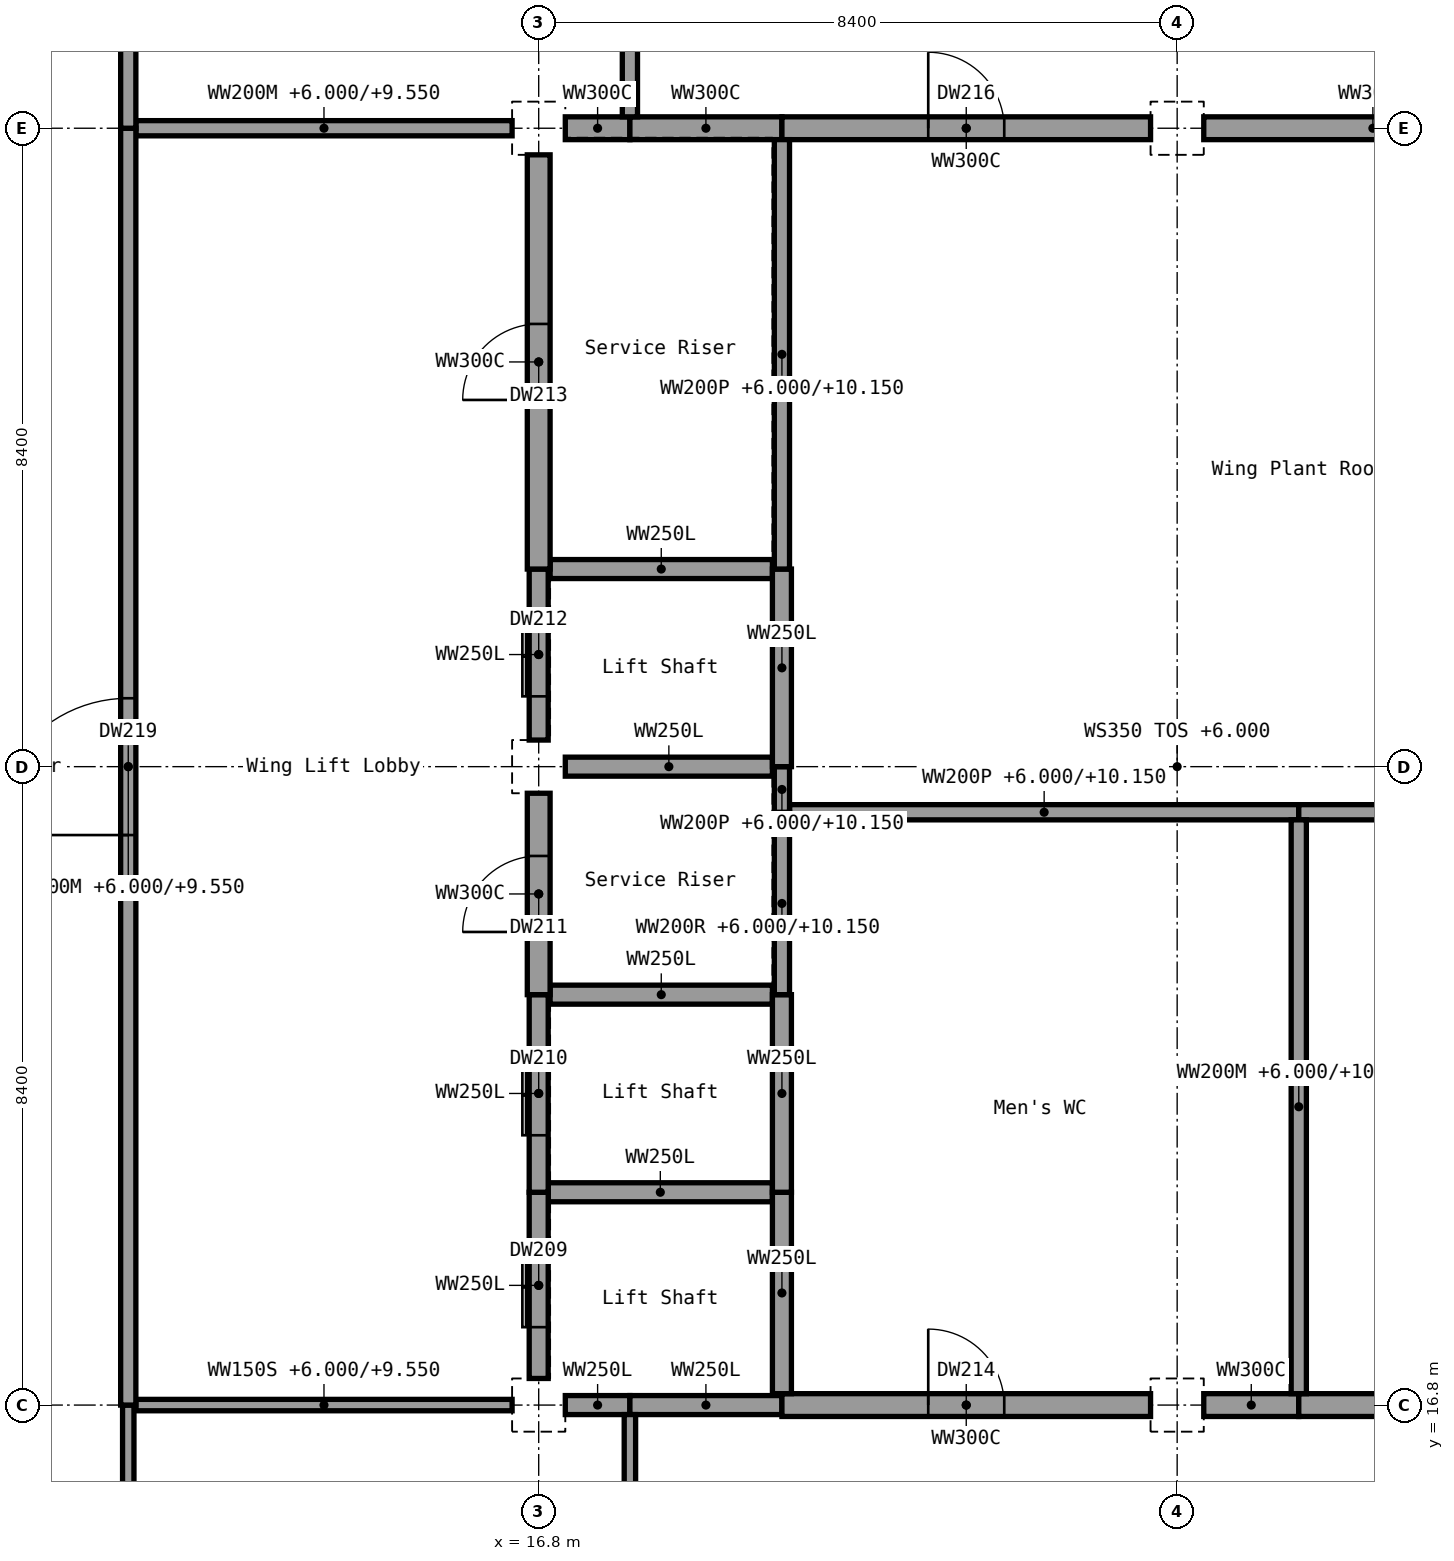
"""IFC4 building model, lengths in metres.
Left out: names, types, materials, properties, quantities, classifications, styles, units other than length and angle.
Written with IfcOpenShell. Run it as: python <this file> out.ifc"""

import sys

from ifc_helpers import new_model, si_unit, direction, frame, frame_2d, origin, origin_2d, place, context, subcontext, project, spatial, rectangle, extrude, element, fill, save


model = new_model("IFC4")
c1 = context("Model", 3, precision=1e-05, world=origin(), true_north=direction((0.0, 1.0)))
c2 = subcontext(c1, "Body", "Model", "MODEL_VIEW")
j1 = project(units=[si_unit("LENGTHUNIT", "METRE"), si_unit("PLANEANGLEUNIT", "RADIAN")], contexts=[c1])
p1 = place(None, origin())
s1 = spatial("IfcSite", under=j1, at=p1, CompositionType="ELEMENT")
p2 = place(p1, origin())
s2 = spatial("IfcBuilding", under=s1, at=p2, CompositionType="ELEMENT")
p3 = place(p2, frame((0.0, 0.0, 6.0)))
s3 = spatial("IfcBuildingStorey", under=s2, at=p3, CompositionType="ELEMENT", Elevation=6.0)
for number, where, z_axis, x_axis in (
    (1, (16.8, 16.8, 0.0), (0.0, 0.0, 1.0), (1.0, 0.0, 0.0)),
    (2, (16.8, 25.2, 0.0), (0.0, 0.0, 1.0), (1.0, 0.0, 0.0)),
    (3, (16.8, 33.6, 0.0), (0.0, 0.0, 1.0), (1.0, 0.0, 0.0)),
    (4, (25.2, 16.8, 0.0), (0.0, 0.0, 1.0), (1.0, 0.0, 0.0)),
    (5, (25.2, 33.6, 0.0), (0.0, 0.0, 1.0), (1.0, 0.0, 0.0)),
):
    element("IfcColumn", number, at=place(p3, frame(where, z_axis=z_axis, x_axis=x_axis)), inside=s3, PredefinedType="COLUMN", context=c2, shape_type="SweptSolid", body=[
        extrude(rectangle(XDim=0.7, YDim=0.7, at=origin_2d()), origin(), (0.0, 0.0, 1.0), 4.5),
    ])
p4 = place(p3, frame((11.5, 16.8, 0.0), z_axis=(0.0, 0.0, 1.0), x_axis=(1.0, 0.0, 0.0)))
e6 = element("IfcWall", 6, at=p4, inside=s3, PredefinedType="PARTITIONING", context=c2, shape_type="SweptSolid", body=[
    extrude(rectangle(XDim=4.95, YDim=0.15, at=frame_2d((2.475, 0.0))), origin(), (0.0, 0.0, 1.0), 3.55),
])
p5 = place(p3, frame((17.15, 16.8, 0.0), z_axis=(0.0, 0.0, 1.0), x_axis=(1.0, 0.0, 0.0)))
e7 = element("IfcWall", 7, at=p5, inside=s3, PredefinedType="SHEAR", context=c2, shape_type="SweptSolid", body=[
    extrude(rectangle(XDim=0.85, YDim=0.25, at=frame_2d((0.425, 0.0))), origin(), (0.0, 0.0, 1.0), 4.15),
])
p6 = place(p3, frame((18.0, 16.8, 0.0), z_axis=(0.0, 0.0, 1.0), x_axis=(1.0, 0.0, 0.0)))
e8 = element("IfcWall", 8, at=p6, inside=s3, PredefinedType="SHEAR", context=c2, shape_type="SweptSolid", body=[
    extrude(rectangle(XDim=2.0, YDim=0.25, at=frame_2d((1.0, 0.0))), origin(), (0.0, 0.0, 1.0), 4.15),
])
p7 = place(p3, frame((20.0, 16.8, 0.0), z_axis=(0.0, 0.0, 1.0), x_axis=(1.0, 0.0, 0.0)))
e9 = element("IfcWall", 9, at=p7, inside=s3, PredefinedType="SHEAR", context=c2, shape_type="SweptSolid", body=[
    extrude(rectangle(XDim=4.85, YDim=0.3, at=frame_2d((2.425, 0.0))), origin(), (0.0, 0.0, 1.0), 4.15),
])
p8 = place(p7, frame((1.925, 0.0, 0.0)))
e10 = element("IfcOpeningElement", 10, at=p8, cuts=e9, PredefinedType="OPENING", context=c2, shape_type="SweptSolid", body=[
    extrude(rectangle(XDim=1.0, YDim=2.1, at=frame_2d((0.5, 1.05))), frame((0.0, 0.15, 0.0), z_axis=(0.0, -1.0, 0.0), x_axis=(1.0, 0.0, 0.0)), (0.0, 0.0, 1.0), 0.3),
])
p9 = place(p3, frame((25.55, 16.8, 0.0), z_axis=(0.0, 0.0, 1.0), x_axis=(1.0, 0.0, 0.0)))
e11 = element("IfcWall", 11, at=p9, inside=s3, PredefinedType="SHEAR", context=c2, shape_type="SweptSolid", body=[
    extrude(rectangle(XDim=1.25, YDim=0.3, at=frame_2d((0.625, 0.0))), origin(), (0.0, 0.0, 1.0), 4.15),
])
p10 = place(p3, frame((26.8, 16.8, 0.0), z_axis=(0.0, 0.0, 1.0), x_axis=(1.0, 0.0, 0.0)))
e12 = element("IfcWall", 12, at=p10, inside=s3, PredefinedType="SHEAR", context=c2, shape_type="SweptSolid", body=[
    extrude(rectangle(XDim=3.2, YDim=0.3, at=frame_2d((1.6, 0.0))), origin(), (0.0, 0.0, 1.0), 4.15),
])
p11 = place(p10, frame((1.1, 0.0, 0.0)))
e13 = element("IfcOpeningElement", 13, at=p11, cuts=e12, PredefinedType="OPENING", context=c2, shape_type="SweptSolid", body=[
    extrude(rectangle(XDim=1.0, YDim=2.1, at=frame_2d((0.5, 1.05))), frame((0.0, 0.15, 0.0), z_axis=(0.0, -1.0, 0.0), x_axis=(1.0, 0.0, 0.0)), (0.0, 0.0, 1.0), 0.3),
])
p12 = place(p3, frame((16.925, 19.6, 0.0), z_axis=(0.0, 0.0, 1.0), x_axis=(1.0, 0.0, 0.0)))
e14 = element("IfcWall", 14, at=p12, inside=s3, PredefinedType="SHEAR", context=c2, shape_type="SweptSolid", body=[
    extrude(rectangle(XDim=2.95, YDim=0.25, at=frame_2d((1.475, 0.0))), origin(), (0.0, 0.0, 1.0), 4.15),
])
p13 = place(p3, frame((16.95, 22.2, 0.0), z_axis=(0.0, 0.0, 1.0), x_axis=(1.0, 0.0, 0.0)))
e15 = element("IfcWall", 15, at=p13, inside=s3, PredefinedType="SHEAR", context=c2, shape_type="SweptSolid", body=[
    extrude(rectangle(XDim=2.925, YDim=0.25, at=frame_2d((1.462, 0.0))), origin(), (0.0, 0.0, 1.0), 4.15),
])
p14 = place(p3, frame((20.1, 24.6, 0.0), z_axis=(0.0, 0.0, 1.0), x_axis=(1.0, 0.0, 0.0)))
e16 = element("IfcWall", 16, at=p14, inside=s3, PredefinedType="SOLIDWALL", context=c2, shape_type="SweptSolid", body=[
    extrude(rectangle(XDim=6.7, YDim=0.2, at=frame_2d((3.35, 0.0))), origin(), (0.0, 0.0, 1.0), 4.15),
])
p15 = place(p3, frame((26.8, 24.6, 0.0), z_axis=(0.0, 0.0, 1.0), x_axis=(1.0, 0.0, 0.0)))
e17 = element("IfcWall", 17, at=p15, inside=s3, PredefinedType="SOLIDWALL", context=c2, shape_type="SweptSolid", body=[
    extrude(rectangle(XDim=6.65, YDim=0.2, at=frame_2d((3.325, 0.0))), origin(), (0.0, 0.0, 1.0), 4.15),
])
p16 = place(p3, frame((17.15, 25.2, 0.0), z_axis=(0.0, 0.0, 1.0), x_axis=(1.0, 0.0, 0.0)))
e18 = element("IfcWall", 18, at=p16, inside=s3, PredefinedType="SHEAR", context=c2, shape_type="SweptSolid", body=[
    extrude(rectangle(XDim=2.725, YDim=0.25, at=frame_2d((1.363, 0.0))), origin(), (0.0, 0.0, 1.0), 4.15),
])
p17 = place(p3, frame((16.95, 27.8, 0.0), z_axis=(0.0, 0.0, 1.0), x_axis=(1.0, 0.0, 0.0)))
e19 = element("IfcWall", 19, at=p17, inside=s3, PredefinedType="SHEAR", context=c2, shape_type="SweptSolid", body=[
    extrude(rectangle(XDim=2.925, YDim=0.25, at=frame_2d((1.462, 0.0))), origin(), (0.0, 0.0, 1.0), 4.15),
])
p18 = place(p3, frame((11.5, 33.6, 0.0), z_axis=(0.0, 0.0, 1.0), x_axis=(1.0, 0.0, 0.0)))
e20 = element("IfcWall", 20, at=p18, inside=s3, PredefinedType="PARTITIONING", context=c2, shape_type="SweptSolid", body=[
    extrude(rectangle(XDim=4.95, YDim=0.2, at=frame_2d((2.475, 0.0))), origin(), (0.0, 0.0, 1.0), 3.55),
])
p19 = place(p3, frame((17.15, 33.6, 0.0), z_axis=(0.0, 0.0, 1.0), x_axis=(1.0, 0.0, 0.0)))
e21 = element("IfcWall", 21, at=p19, inside=s3, PredefinedType="SHEAR", context=c2, shape_type="SweptSolid", body=[
    extrude(rectangle(XDim=0.85, YDim=0.3, at=frame_2d((0.425, 0.0))), origin(), (0.0, 0.0, 1.0), 4.15),
])
p20 = place(p3, frame((18.0, 33.6, 0.0), z_axis=(0.0, 0.0, 1.0), x_axis=(1.0, 0.0, 0.0)))
e22 = element("IfcWall", 22, at=p20, inside=s3, PredefinedType="SHEAR", context=c2, shape_type="SweptSolid", body=[
    extrude(rectangle(XDim=2.0, YDim=0.3, at=frame_2d((1.0, 0.0))), origin(), (0.0, 0.0, 1.0), 4.15),
])
p21 = place(p3, frame((20.0, 33.6, 0.0), z_axis=(0.0, 0.0, 1.0), x_axis=(1.0, 0.0, 0.0)))
e23 = element("IfcWall", 23, at=p21, inside=s3, PredefinedType="SHEAR", context=c2, shape_type="SweptSolid", body=[
    extrude(rectangle(XDim=4.85, YDim=0.3, at=frame_2d((2.425, 0.0))), origin(), (0.0, 0.0, 1.0), 4.15),
])
p22 = place(p21, frame((1.925, 0.0, 0.0)))
e24 = element("IfcOpeningElement", 24, at=p22, cuts=e23, PredefinedType="OPENING", context=c2, shape_type="SweptSolid", body=[
    extrude(rectangle(XDim=1.0, YDim=2.1, at=frame_2d((0.5, 1.05))), frame((0.0, 0.15, 0.0), z_axis=(0.0, -1.0, 0.0), x_axis=(1.0, 0.0, 0.0)), (0.0, 0.0, 1.0), 0.3),
])
p23 = place(p3, frame((25.55, 33.6, 0.0), z_axis=(0.0, 0.0, 1.0), x_axis=(1.0, 0.0, 0.0)))
e25 = element("IfcWall", 25, at=p23, inside=s3, PredefinedType="SHEAR", context=c2, shape_type="SweptSolid", body=[
    extrude(rectangle(XDim=4.45, YDim=0.3, at=frame_2d((2.225, 0.0))), origin(), (0.0, 0.0, 1.0), 4.15),
])
p24 = place(p3, frame((11.4, 11.4, 0.0), z_axis=(0.0, 0.0, 1.0), x_axis=(0.0, 1.0, 0.0)))
e26 = element("IfcWall", 26, at=p24, inside=s3, PredefinedType="PARTITIONING", context=c2, shape_type="SweptSolid", body=[
    extrude(rectangle(XDim=5.4, YDim=0.15, at=frame_2d((2.7, 0.0))), origin(), (0.0, 0.0, 1.0), 3.55),
])
p25 = place(p3, frame((11.4, 16.8, 0.0), z_axis=(0.0, 0.0, 1.0), x_axis=(0.0, 1.0, 0.0)))
e27 = element("IfcWall", 27, at=p25, inside=s3, PredefinedType="PARTITIONING", context=c2, shape_type="SweptSolid", body=[
    extrude(rectangle(XDim=16.8, YDim=0.2, at=frame_2d((8.4, 0.0))), origin(), (0.0, 0.0, 1.0), 3.55),
])
p26 = place(p25, frame((7.5, 0.0, 0.0)))
e28 = element("IfcOpeningElement", 28, at=p26, cuts=e27, PredefinedType="OPENING", context=c2, shape_type="SweptSolid", body=[
    extrude(rectangle(XDim=1.8, YDim=2.1, at=frame_2d((0.9, 1.05))), frame((0.0, 0.1, 0.0), z_axis=(0.0, -1.0, 0.0), x_axis=(1.0, 0.0, 0.0)), (0.0, 0.0, 1.0), 0.2),
])
p27 = place(p3, frame((11.4, 33.6, 0.0), z_axis=(0.0, 0.0, 1.0), x_axis=(0.0, 1.0, 0.0)))
e29 = element("IfcWall", 29, at=p27, inside=s3, PredefinedType="PARTITIONING", context=c2, shape_type="SweptSolid", body=[
    extrude(rectangle(XDim=5.4, YDim=0.2, at=frame_2d((2.7, 0.0))), origin(), (0.0, 0.0, 1.0), 3.55),
])
p28 = place(p3, frame((16.8, 17.15, 0.0), z_axis=(0.0, 0.0, 1.0), x_axis=(0.0, 1.0, 0.0)))
e30 = element("IfcWall", 30, at=p28, inside=s3, PredefinedType="SHEAR", context=c2, shape_type="SweptSolid", body=[
    extrude(rectangle(XDim=2.45, YDim=0.25, at=frame_2d((1.225, 0.0))), origin(), (0.0, 0.0, 1.0), 4.15),
])
p29 = place(p28, frame((0.675, 0.0, 0.0)))
e31 = element("IfcOpeningElement", 31, at=p29, cuts=e30, PredefinedType="OPENING", context=c2, shape_type="SweptSolid", body=[
    extrude(rectangle(XDim=1.1, YDim=2.1, at=frame_2d((0.55, 1.05))), frame((0.0, 0.125, 0.0), z_axis=(0.0, -1.0, 0.0), x_axis=(1.0, 0.0, 0.0)), (0.0, 0.0, 1.0), 0.25),
])
p30 = place(p3, frame((16.8, 19.6, 0.0), z_axis=(0.0, 0.0, 1.0), x_axis=(0.0, 1.0, 0.0)))
e32 = element("IfcWall", 32, at=p30, inside=s3, PredefinedType="SHEAR", context=c2, shape_type="SweptSolid", body=[
    extrude(rectangle(XDim=2.6, YDim=0.25, at=frame_2d((1.3, 0.0))), origin(), (0.0, 0.0, 1.0), 4.15),
])
p31 = place(p30, frame((0.75, 0.0, 0.0)))
e33 = element("IfcOpeningElement", 33, at=p31, cuts=e32, PredefinedType="OPENING", context=c2, shape_type="SweptSolid", body=[
    extrude(rectangle(XDim=1.1, YDim=2.1, at=frame_2d((0.55, 1.05))), frame((0.0, 0.125, 0.0), z_axis=(0.0, -1.0, 0.0), x_axis=(1.0, 0.0, 0.0)), (0.0, 0.0, 1.0), 0.25),
])
p32 = place(p3, frame((16.8, 22.2, 0.0), z_axis=(0.0, 0.0, 1.0), x_axis=(0.0, 1.0, 0.0)))
e34 = element("IfcWall", 34, at=p32, inside=s3, PredefinedType="SHEAR", context=c2, shape_type="SweptSolid", body=[
    extrude(rectangle(XDim=2.65, YDim=0.3, at=frame_2d((1.325, 0.0))), origin(), (0.0, 0.0, 1.0), 4.15),
])
p33 = place(p32, frame((0.825, 0.0, 0.0)))
e35 = element("IfcOpeningElement", 35, at=p33, cuts=e34, PredefinedType="OPENING", context=c2, shape_type="SweptSolid", body=[
    extrude(rectangle(XDim=1.0, YDim=2.1, at=frame_2d((0.5, 1.05))), frame((0.0, 0.15, 0.0), z_axis=(0.0, -1.0, 0.0), x_axis=(1.0, 0.0, 0.0)), (0.0, 0.0, 1.0), 0.3),
])
p34 = place(p3, frame((16.8, 25.55, 0.0), z_axis=(0.0, 0.0, 1.0), x_axis=(0.0, 1.0, 0.0)))
e36 = element("IfcWall", 36, at=p34, inside=s3, PredefinedType="SHEAR", context=c2, shape_type="SweptSolid", body=[
    extrude(rectangle(XDim=2.25, YDim=0.25, at=frame_2d((1.125, 0.0))), origin(), (0.0, 0.0, 1.0), 4.15),
])
p35 = place(p34, frame((0.575, 0.0, 0.0)))
e37 = element("IfcOpeningElement", 37, at=p35, cuts=e36, PredefinedType="OPENING", context=c2, shape_type="SweptSolid", body=[
    extrude(rectangle(XDim=1.1, YDim=2.1, at=frame_2d((0.55, 1.05))), frame((0.0, 0.125, 0.0), z_axis=(0.0, -1.0, 0.0), x_axis=(1.0, 0.0, 0.0)), (0.0, 0.0, 1.0), 0.25),
])
p36 = place(p3, frame((16.8, 27.8, 0.0), z_axis=(0.0, 0.0, 1.0), x_axis=(0.0, 1.0, 0.0)))
e38 = element("IfcWall", 38, at=p36, inside=s3, PredefinedType="SHEAR", context=c2, shape_type="SweptSolid", body=[
    extrude(rectangle(XDim=5.45, YDim=0.3, at=frame_2d((2.725, 0.0))), origin(), (0.0, 0.0, 1.0), 4.15),
])
p37 = place(p36, frame((2.225, 0.0, 0.0)))
e39 = element("IfcOpeningElement", 39, at=p37, cuts=e38, PredefinedType="OPENING", context=c2, shape_type="SweptSolid", body=[
    extrude(rectangle(XDim=1.0, YDim=2.1, at=frame_2d((0.5, 1.05))), frame((0.0, 0.15, 0.0), z_axis=(0.0, -1.0, 0.0), x_axis=(1.0, 0.0, 0.0)), (0.0, 0.0, 1.0), 0.3),
])
p38 = place(p3, frame((18.0, 11.5, 0.0), z_axis=(0.0, 0.0, 1.0), x_axis=(0.0, 1.0, 0.0)))
e40 = element("IfcWall", 40, at=p38, inside=s3, PredefinedType="PARTITIONING", context=c2, shape_type="SweptSolid", body=[
    extrude(rectangle(XDim=5.175, YDim=0.15, at=frame_2d((2.587, 0.0))), origin(), (0.0, 0.0, 1.0), 4.15),
])
p39 = place(p3, frame((18.0, 33.75, 0.0), z_axis=(0.0, 0.0, 1.0), x_axis=(0.0, 1.0, 0.0)))
e41 = element("IfcWall", 41, at=p39, inside=s3, PredefinedType="SOLIDWALL", context=c2, shape_type="SweptSolid", body=[
    extrude(rectangle(XDim=5.15, YDim=0.2, at=frame_2d((2.575, 0.0))), origin(), (0.0, 0.0, 1.0), 4.15),
])
p40 = place(p3, frame((20.0, 16.95, 0.0), z_axis=(0.0, 0.0, 1.0), x_axis=(0.0, 1.0, 0.0)))
e42 = element("IfcWall", 42, at=p40, inside=s3, PredefinedType="SHEAR", context=c2, shape_type="SweptSolid", body=[
    extrude(rectangle(XDim=2.65, YDim=0.25, at=frame_2d((1.325, 0.0))), origin(), (0.0, 0.0, 1.0), 4.15),
])
p41 = place(p3, frame((20.0, 19.6, 0.0), z_axis=(0.0, 0.0, 1.0), x_axis=(0.0, 1.0, 0.0)))
e43 = element("IfcWall", 43, at=p41, inside=s3, PredefinedType="SHEAR", context=c2, shape_type="SweptSolid", body=[
    extrude(rectangle(XDim=2.6, YDim=0.25, at=frame_2d((1.3, 0.0))), origin(), (0.0, 0.0, 1.0), 4.15),
])
p42 = place(p3, frame((20.0, 22.2, 0.0), z_axis=(0.0, 0.0, 1.0), x_axis=(0.0, 1.0, 0.0)))
e44 = element("IfcWall", 44, at=p42, inside=s3, PredefinedType="SOLIDWALL", context=c2, shape_type="SweptSolid", body=[
    extrude(rectangle(XDim=2.4, YDim=0.2, at=frame_2d((1.2, 0.0))), origin(), (0.0, 0.0, 1.0), 4.15),
])
p43 = place(p3, frame((20.0, 24.6, 0.0), z_axis=(0.0, 0.0, 1.0), x_axis=(0.0, 1.0, 0.0)))
e45 = element("IfcWall", 45, at=p43, inside=s3, PredefinedType="SOLIDWALL", context=c2, shape_type="SweptSolid", body=[
    extrude(rectangle(XDim=0.6, YDim=0.2, at=frame_2d((0.3, 0.0))), origin(), (0.0, 0.0, 1.0), 4.15),
])
p44 = place(p3, frame((20.0, 25.2, 0.0), z_axis=(0.0, 0.0, 1.0), x_axis=(0.0, 1.0, 0.0)))
e46 = element("IfcWall", 46, at=p44, inside=s3, PredefinedType="SHEAR", context=c2, shape_type="SweptSolid", body=[
    extrude(rectangle(XDim=2.6, YDim=0.25, at=frame_2d((1.3, 0.0))), origin(), (0.0, 0.0, 1.0), 4.15),
])
p45 = place(p3, frame((20.0, 27.8, 0.0), z_axis=(0.0, 0.0, 1.0), x_axis=(0.0, 1.0, 0.0)))
e47 = element("IfcWall", 47, at=p45, inside=s3, PredefinedType="SOLIDWALL", context=c2, shape_type="SweptSolid", body=[
    extrude(rectangle(XDim=5.65, YDim=0.2, at=frame_2d((2.825, 0.0))), origin(), (0.0, 0.0, 1.0), 4.15),
])
p46 = place(p3, frame((26.8, 16.95, 0.0), z_axis=(0.0, 0.0, 1.0), x_axis=(0.0, 1.0, 0.0)))
e48 = element("IfcWall", 48, at=p46, inside=s3, PredefinedType="PARTITIONING", context=c2, shape_type="SweptSolid", body=[
    extrude(rectangle(XDim=7.55, YDim=0.2, at=frame_2d((3.775, 0.0))), origin(), (0.0, 0.0, 1.0), 4.15),
])
p47 = place(p29, origin())
e49 = element("IfcDoor", 49, at=p47, inside=s3, OperationType="DOUBLE_DOOR_SLIDING", PredefinedType="DOOR", context=c2, shape_type="SweptSolid", body=[
    extrude(rectangle(XDim=1.1, YDim=2.1, at=frame_2d((0.55, 1.05))), frame((0.0, 0.025, 0.0), z_axis=(0.0, -1.0, 0.0), x_axis=(1.0, 0.0, 0.0)), (0.0, 0.0, 1.0), 0.05),
])
fill(e31, e49)
p48 = place(p31, origin())
e50 = element("IfcDoor", 50, at=p48, inside=s3, OperationType="DOUBLE_DOOR_SLIDING", PredefinedType="DOOR", context=c2, shape_type="SweptSolid", body=[
    extrude(rectangle(XDim=1.1, YDim=2.1, at=frame_2d((0.55, 1.05))), frame((0.0, 0.025, 0.0), z_axis=(0.0, -1.0, 0.0), x_axis=(1.0, 0.0, 0.0)), (0.0, 0.0, 1.0), 0.05),
])
fill(e33, e50)
p49 = place(p33, origin())
e51 = element("IfcDoor", 51, at=p49, inside=s3, OperationType="SINGLE_SWING_LEFT", PredefinedType="DOOR", context=c2, shape_type="SweptSolid", body=[
    extrude(rectangle(XDim=1.0, YDim=2.1, at=frame_2d((0.5, 1.05))), frame((0.0, 0.025, 0.0), z_axis=(0.0, -1.0, 0.0), x_axis=(1.0, 0.0, 0.0)), (0.0, 0.0, 1.0), 0.05),
])
fill(e35, e51)
p50 = place(p35, origin())
e52 = element("IfcDoor", 52, at=p50, inside=s3, OperationType="DOUBLE_DOOR_SLIDING", PredefinedType="DOOR", context=c2, shape_type="SweptSolid", body=[
    extrude(rectangle(XDim=1.1, YDim=2.1, at=frame_2d((0.55, 1.05))), frame((0.0, 0.025, 0.0), z_axis=(0.0, -1.0, 0.0), x_axis=(1.0, 0.0, 0.0)), (0.0, 0.0, 1.0), 0.05),
])
fill(e37, e52)
p51 = place(p37, origin())
e53 = element("IfcDoor", 53, at=p51, inside=s3, OperationType="SINGLE_SWING_LEFT", PredefinedType="DOOR", context=c2, shape_type="SweptSolid", body=[
    extrude(rectangle(XDim=1.0, YDim=2.1, at=frame_2d((0.5, 1.05))), frame((0.0, 0.025, 0.0), z_axis=(0.0, -1.0, 0.0), x_axis=(1.0, 0.0, 0.0)), (0.0, 0.0, 1.0), 0.05),
])
fill(e39, e53)
p52 = place(p8, origin())
e54 = element("IfcDoor", 54, at=p52, inside=s3, OperationType="SINGLE_SWING_LEFT", PredefinedType="DOOR", context=c2, shape_type="SweptSolid", body=[
    extrude(rectangle(XDim=1.0, YDim=2.1, at=frame_2d((0.5, 1.05))), frame((0.0, 0.025, 0.0), z_axis=(0.0, -1.0, 0.0), x_axis=(1.0, 0.0, 0.0)), (0.0, 0.0, 1.0), 0.05),
])
fill(e10, e54)
p53 = place(p22, origin())
e55 = element("IfcDoor", 55, at=p53, inside=s3, OperationType="SINGLE_SWING_LEFT", PredefinedType="DOOR", context=c2, shape_type="SweptSolid", body=[
    extrude(rectangle(XDim=1.0, YDim=2.1, at=frame_2d((0.5, 1.05))), frame((0.0, 0.025, 0.0), z_axis=(0.0, -1.0, 0.0), x_axis=(1.0, 0.0, 0.0)), (0.0, 0.0, 1.0), 0.05),
])
fill(e24, e55)
p54 = place(p26, origin())
e56 = element("IfcDoor", 56, at=p54, inside=s3, OperationType="DOUBLE_DOOR_DOUBLE_SWING", PredefinedType="DOOR", context=c2, shape_type="SweptSolid", body=[
    extrude(rectangle(XDim=1.8, YDim=2.1, at=frame_2d((0.9, 1.05))), frame((0.0, 0.025, 0.0), z_axis=(0.0, -1.0, 0.0), x_axis=(1.0, 0.0, 0.0)), (0.0, 0.0, 1.0), 0.05),
])
fill(e28, e56)
save(model, sys.argv[1])
